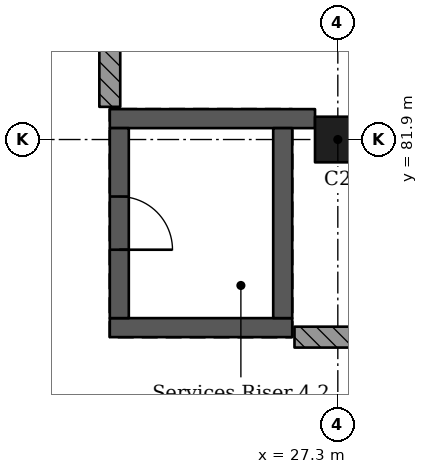
"""IFC4 building model, lengths in metres.
Left out: names, types, materials, properties, quantities, classifications, styles, units other than length and angle.
Written with IfcOpenShell. Run it as: python <this file> out.ifc"""

import sys

from ifc_helpers import new_model, si_unit, direction, frame, frame_2d, origin, origin_2d, place, context, subcontext, project, spatial, rectangle, extrude, element, fill, save


model = new_model("IFC4")
c1 = context("Model", 3, precision=1e-05, world=origin(), true_north=direction((0.0, 1.0)))
c2 = subcontext(c1, "Body", "Model", "MODEL_VIEW")
j1 = project(units=[si_unit("LENGTHUNIT", "METRE"), si_unit("PLANEANGLEUNIT", "RADIAN")], contexts=[c1])
p1 = place(None, origin())
s1 = spatial("IfcSite", under=j1, at=p1, CompositionType="ELEMENT")
p2 = place(p1, origin())
s2 = spatial("IfcBuilding", under=s1, at=p2, CompositionType="ELEMENT")
p3 = place(p2, frame((0.0, 0.0, 20.02)))
s3 = spatial("IfcBuildingStorey", under=s2, at=p3, CompositionType="ELEMENT", Elevation=20.02)
p4 = place(p3, frame((27.3, 81.9, 0.0), z_axis=(0.0, 0.0, 1.0), x_axis=(1.0, 0.0, 0.0)))
e1 = element("IfcColumn", 1, at=p4, inside=s3, PredefinedType="COLUMN", context=c2, shape_type="SweptSolid", body=[
    extrude(rectangle(XDim=0.6, YDim=0.6, at=origin_2d()), origin(), (0.0, 0.0, 1.0), 4.55),
])
p5 = place(p3, frame((26.7, 79.425, 0.0), z_axis=(0.0, 0.0, 1.0), x_axis=(-1.0, 0.0, 0.0)))
e2 = element("IfcWall", 2, at=p5, inside=s3, PredefinedType="SHEAR", context=c2, shape_type="SweptSolid", body=[
    extrude(rectangle(XDim=2.4, YDim=0.25, at=frame_2d((1.2, 0.0))), origin(), (0.0, 0.0, 1.0), 4.55),
])
p6 = place(p3, frame((27.0, 82.175, 0.0), z_axis=(0.0, 0.0, 1.0), x_axis=(-1.0, 0.0, 0.0)))
e3 = element("IfcWall", 3, at=p6, inside=s3, PredefinedType="SHEAR", context=c2, shape_type="SweptSolid", body=[
    extrude(rectangle(XDim=2.7, YDim=0.25, at=frame_2d((1.35, 0.0))), origin(), (0.0, 0.0, 1.0), 4.55),
])
p7 = place(p3, frame((24.425, 82.05, 0.0), z_axis=(0.0, 0.0, 1.0), x_axis=(0.0, -1.0, 0.0)))
e4 = element("IfcWall", 4, at=p7, inside=s3, PredefinedType="SHEAR", context=c2, shape_type="SweptSolid", body=[
    extrude(rectangle(XDim=2.5, YDim=0.25, at=frame_2d((1.25, 0.0))), origin(), (0.0, 0.0, 1.0), 4.55),
])
p8 = place(p7, frame((0.9, 0.0, 0.0)))
e5 = element("IfcOpeningElement", 5, at=p8, cuts=e4, PredefinedType="OPENING", context=c2, shape_type="SweptSolid", body=[
    extrude(rectangle(XDim=0.7, YDim=2.1, at=frame_2d((0.35, 1.05))), frame((0.0, 0.135, 0.0), z_axis=(0.0, -1.0, 0.0), x_axis=(1.0, 0.0, 0.0)), (0.0, 0.0, 1.0), 0.27),
])
p9 = place(p3, frame((26.575, 82.05, 0.0), z_axis=(0.0, 0.0, 1.0), x_axis=(0.0, -1.0, 0.0)))
e6 = element("IfcWall", 6, at=p9, inside=s3, PredefinedType="SHEAR", context=c2, shape_type="SweptSolid", body=[
    extrude(rectangle(XDim=2.5, YDim=0.25, at=frame_2d((1.25, 0.0))), origin(), (0.0, 0.0, 1.0), 4.55),
])
p10 = place(p3, frame((24.3, 82.33, 0.0), z_axis=(0.0, 0.0, 1.0), x_axis=(0.0, 1.0, 0.0)))
e7 = element("IfcWall", 7, at=p10, inside=s3, PredefinedType="SOLIDWALL", context=c2, shape_type="SweptSolid", body=[
    extrude(rectangle(XDim=6.932, YDim=0.275, at=frame_2d((3.466, 0.0))), origin(), (0.0, 0.0, 1.0), 4.25),
])
p11 = place(p3, frame((28.238, 79.3, 0.0), z_axis=(0.0, 0.0, 1.0), x_axis=(-1.0, 0.0, 0.0)))
e8 = element("IfcWall", 8, at=p11, inside=s3, PredefinedType="SOLIDWALL", context=c2, shape_type="SweptSolid", body=[
    extrude(rectangle(XDim=1.508, YDim=0.275, at=frame_2d((0.754, 0.0))), origin(), (0.0, 0.0, 1.0), 4.25),
])
p12 = place(p8, origin())
e9 = element("IfcDoor", 9, at=p12, inside=s3, OperationType="SINGLE_SWING_LEFT", PredefinedType="DOOR", context=c2, shape_type="SweptSolid", body=[
    extrude(rectangle(XDim=0.7, YDim=2.1, at=frame_2d((0.35, 1.05))), frame((0.0, 0.025, 0.0), z_axis=(0.0, -1.0, 0.0), x_axis=(1.0, 0.0, 0.0)), (0.0, 0.0, 1.0), 0.05),
])
fill(e5, e9)
save(model, sys.argv[1])
